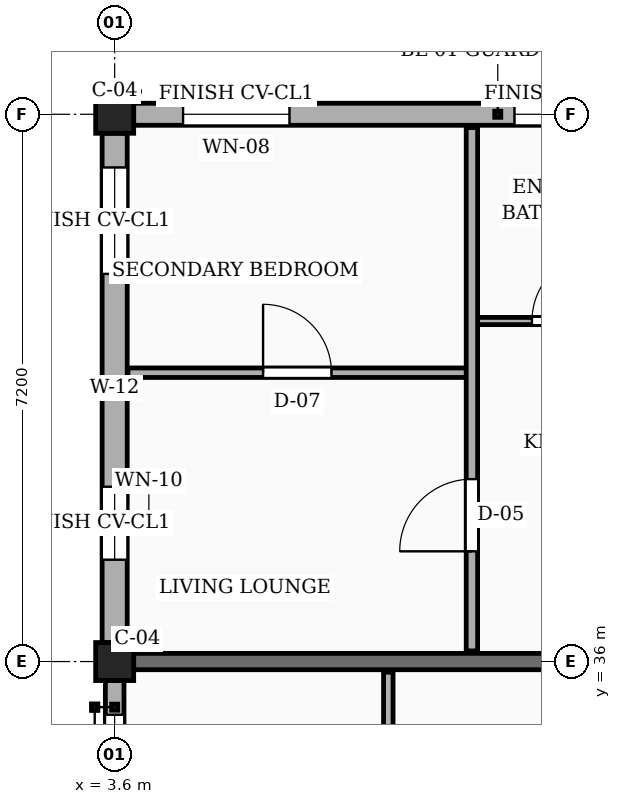
"""IFC4 building model, lengths in metres.
Left out: names, types, materials, properties, quantities, classifications, styles, units other than length and angle.
Written with IfcOpenShell. Run it as: python <this file> out.ifc"""

import sys

from ifc_helpers import new_model, si_unit, direction, frame, frame_2d, origin, origin_2d, place, context, subcontext, project, spatial, rectangle, extrude, element, fill, save


model = new_model("IFC4")
c1 = context("Model", 3, precision=1e-05, world=origin(), true_north=direction((0.0, 1.0)))
c2 = subcontext(c1, "Body", "Model", "MODEL_VIEW")
j1 = project(units=[si_unit("LENGTHUNIT", "METRE"), si_unit("PLANEANGLEUNIT", "RADIAN")], contexts=[c1])
p1 = place(None, origin())
s1 = spatial("IfcSite", under=j1, at=p1, CompositionType="ELEMENT")
p2 = place(p1, origin())
s2 = spatial("IfcBuilding", under=s1, at=p2, CompositionType="ELEMENT")
p3 = place(p2, frame((0.0, 0.0, 32.85)))
s3 = spatial("IfcBuildingStorey", under=s2, at=p3, CompositionType="ELEMENT", Elevation=32.85)
for number, where, z_axis, x_axis in (
    (1, (3.6, 36.0, 0.0), (0.0, 0.0, 1.0), (1.0, 0.0, 0.0)),
    (2, (3.6, 43.2, 0.0), (0.0, 0.0, 1.0), (1.0, 0.0, 0.0)),
):
    element("IfcColumn", number, at=place(p3, frame(where, z_axis=z_axis, x_axis=x_axis)), inside=s3, PredefinedType="COLUMN", context=c2, shape_type="SweptSolid", body=[
        extrude(rectangle(XDim=0.5, YDim=0.5, at=origin_2d()), origin(), (0.0, 0.0, 1.0), 3.15),
    ])
p4 = place(p3, frame((3.85, 36.0, 0.0), z_axis=(0.0, 0.0, 1.0), x_axis=(1.0, 0.0, 0.0)))
e3 = element("IfcWall", 3, at=p4, inside=s3, PredefinedType="SOLIDWALL", context=c2, shape_type="SweptSolid", body=[
    extrude(rectangle(XDim=6.75, YDim=0.215, at=frame_2d((3.375, 0.0))), origin(), (0.0, 0.0, 1.0), 2.17),
])
p5 = place(p3, frame((10.55, 43.2, 0.0), z_axis=(0.0, 0.0, 1.0), x_axis=(-1.0, 0.0, 0.0)))
e4 = element("IfcWall", 4, at=p5, inside=s3, PredefinedType="SOLIDWALL", context=c2, shape_type="SweptSolid", body=[
    extrude(rectangle(XDim=6.7, YDim=0.29, at=frame_2d((3.35, 0.0))), origin(), (0.0, 0.0, 1.0), 2.44),
])
p6 = place(p5, frame((0.45, 0.0, 0.78)))
e5 = element("IfcOpeningElement", 5, at=p6, cuts=e4, PredefinedType="OPENING", context=c2, shape_type="SweptSolid", body=[
    extrude(rectangle(XDim=1.24, YDim=1.15, at=frame_2d((0.62, 0.575))), frame((0.0, 0.155, 0.0), z_axis=(0.0, -1.0, 0.0), x_axis=(1.0, 0.0, 0.0)), (0.0, 0.0, 1.0), 0.31),
])
p7 = place(p5, frame((4.65, 0.0, 0.78)))
e6 = element("IfcOpeningElement", 6, at=p7, cuts=e4, PredefinedType="OPENING", context=c2, shape_type="SweptSolid", body=[
    extrude(rectangle(XDim=1.4, YDim=1.15, at=frame_2d((0.7, 0.575))), frame((0.0, 0.155, 0.0), z_axis=(0.0, -1.0, 0.0), x_axis=(1.0, 0.0, 0.0)), (0.0, 0.0, 1.0), 0.31),
])
p8 = place(p3, frame((3.6, 42.95, 0.0), z_axis=(0.0, 0.0, 1.0), x_axis=(0.0, -1.0, 0.0)))
e7 = element("IfcWall", 7, at=p8, inside=s3, PredefinedType="SOLIDWALL", context=c2, shape_type="SweptSolid", body=[
    extrude(rectangle(XDim=6.7, YDim=0.33, at=frame_2d((3.35, 0.0))), origin(), (0.0, 0.0, 1.0), 2.44),
])
p9 = place(p8, frame((0.45, 0.0, 0.78)))
e8 = element("IfcOpeningElement", 8, at=p9, cuts=e7, PredefinedType="OPENING", context=c2, shape_type="SweptSolid", body=[
    extrude(rectangle(XDim=1.4, YDim=1.15, at=frame_2d((0.7, 0.575))), frame((0.0, 0.175, 0.0), z_axis=(0.0, -1.0, 0.0), x_axis=(1.0, 0.0, 0.0)), (0.0, 0.0, 1.0), 0.35),
])
p10 = place(p8, frame((4.65, 0.0, 0.78)))
e9 = element("IfcOpeningElement", 9, at=p10, cuts=e7, PredefinedType="OPENING", context=c2, shape_type="SweptSolid", body=[
    extrude(rectangle(XDim=0.96, YDim=1.26, at=frame_2d((0.48, 0.63))), frame((0.0, 0.175, 0.0), z_axis=(0.0, -1.0, 0.0), x_axis=(1.0, 0.0, 0.0)), (0.0, 0.0, 1.0), 0.35),
])
p11 = place(p3, frame((3.6, 35.75, 0.0), z_axis=(0.0, 0.0, 1.0), x_axis=(0.0, -1.0, 0.0)))
e10 = element("IfcWall", 10, at=p11, inside=s3, PredefinedType="SOLIDWALL", context=c2, shape_type="SweptSolid", body=[
    extrude(rectangle(XDim=6.7, YDim=0.245, at=frame_2d((3.35, 0.0))), origin(), (0.0, 0.0, 1.0), 2.44),
])
p12 = place(p11, frame((0.45, 0.0, 0.78)))
e11 = element("IfcOpeningElement", 11, at=p12, cuts=e10, PredefinedType="OPENING", context=c2, shape_type="SweptSolid", body=[
    extrude(rectangle(XDim=0.96, YDim=1.26, at=frame_2d((0.48, 0.63))), frame((0.0, 0.133, 0.0), z_axis=(0.0, -1.0, 0.0), x_axis=(1.0, 0.0, 0.0)), (0.0, 0.0, 1.0), 0.265),
])
p13 = place(p11, frame((4.65, 0.0, 0.78)))
e12 = element("IfcOpeningElement", 12, at=p13, cuts=e10, PredefinedType="OPENING", context=c2, shape_type="SweptSolid", body=[
    extrude(rectangle(XDim=1.12, YDim=1.26, at=frame_2d((0.56, 0.63))), frame((0.0, 0.133, 0.0), z_axis=(0.0, -1.0, 0.0), x_axis=(1.0, 0.0, 0.0)), (0.0, 0.0, 1.0), 0.265),
])
p14 = place(p3, frame((7.2, 28.94, 0.0), z_axis=(0.0, 0.0, 1.0), x_axis=(0.0, 1.0, 0.0)))
e13 = element("IfcWall", 13, at=p14, inside=s3, PredefinedType="PARTITIONING", context=c2, shape_type="SweptSolid", body=[
    extrude(rectangle(XDim=6.92, YDim=0.125, at=frame_2d((3.46, 0.0))), origin(), (0.0, 0.0, 1.0), 2.305),
])
p15 = place(p14, frame((1.05, 0.0, 0.0)))
e14 = element("IfcOpeningElement", 14, at=p15, cuts=e13, PredefinedType="OPENING", context=c2, shape_type="SweptSolid", body=[
    extrude(rectangle(XDim=0.87, YDim=2.05, at=frame_2d((0.435, 1.025))), frame((0.0, 0.073, 0.0), z_axis=(0.0, -1.0, 0.0), x_axis=(1.0, 0.0, 0.0)), (0.0, 0.0, 1.0), 0.145),
])
p16 = place(p14, frame((4.45, 0.0, 0.0)))
e15 = element("IfcOpeningElement", 15, at=p16, cuts=e13, PredefinedType="OPENING", context=c2, shape_type="SweptSolid", body=[
    extrude(rectangle(XDim=0.88, YDim=2.08, at=frame_2d((0.44, 1.04))), frame((0.0, 0.073, 0.0), z_axis=(0.0, -1.0, 0.0), x_axis=(1.0, 0.0, 0.0)), (0.0, 0.0, 1.0), 0.145),
])
p17 = place(p3, frame((3.775, 39.8, 0.0), z_axis=(0.0, 0.0, 1.0), x_axis=(1.0, 0.0, 0.0)))
e16 = element("IfcWall", 16, at=p17, inside=s3, PredefinedType="PARTITIONING", context=c2, shape_type="SweptSolid", body=[
    extrude(rectangle(XDim=4.455, YDim=0.125, at=frame_2d((2.228, 0.0))), origin(), (0.0, 0.0, 1.0), 2.305),
])
p18 = place(p17, frame((1.778, 0.0, 0.0)))
e17 = element("IfcOpeningElement", 17, at=p18, cuts=e16, PredefinedType="OPENING", context=c2, shape_type="SweptSolid", body=[
    extrude(rectangle(XDim=0.9, YDim=2.1, at=frame_2d((0.45, 1.05))), frame((0.0, 0.073, 0.0), z_axis=(0.0, -1.0, 0.0), x_axis=(1.0, 0.0, 0.0)), (0.0, 0.0, 1.0), 0.145),
])
p19 = place(p3, frame((8.37, 40.48, 0.0), z_axis=(0.0, 0.0, 1.0), x_axis=(1.0, 0.0, 0.0)))
e18 = element("IfcWall", 18, at=p19, inside=s3, PredefinedType="PARTITIONING", context=c2, shape_type="SweptSolid", body=[
    extrude(rectangle(XDim=2.34, YDim=0.095, at=frame_2d((1.17, 0.0))), origin(), (0.0, 0.0, 1.0), 2.305),
])
p20 = place(p19, frame((0.72, 0.0, 0.0)))
e19 = element("IfcOpeningElement", 19, at=p20, cuts=e18, PredefinedType="OPENING", context=c2, shape_type="SweptSolid", body=[
    extrude(rectangle(XDim=0.9, YDim=2.05, at=frame_2d((0.45, 1.025))), frame((0.0, 0.058, 0.0), z_axis=(0.0, -1.0, 0.0), x_axis=(1.0, 0.0, 0.0)), (0.0, 0.0, 1.0), 0.115),
])
p21 = place(p3, frame((8.3, 36.14, 0.0), z_axis=(0.0, 0.0, 1.0), x_axis=(0.0, 1.0, 0.0)))
e20 = element("IfcWall", 20, at=p21, inside=s3, PredefinedType="PARTITIONING", context=c2, shape_type="SweptSolid", body=[
    extrude(rectangle(XDim=6.885, YDim=0.15, at=frame_2d((3.442, 0.0))), origin(), (0.0, 0.0, 1.0), 2.305),
])
p22 = place(p21, frame((1.31, 0.0, 0.0)))
e21 = element("IfcOpeningElement", 21, at=p22, cuts=e20, PredefinedType="OPENING", context=c2, shape_type="SweptSolid", body=[
    extrude(rectangle(XDim=0.95, YDim=2.1, at=frame_2d((0.475, 1.05))), frame((0.0, 0.085, 0.0), z_axis=(0.0, -1.0, 0.0), x_axis=(1.0, 0.0, 0.0)), (0.0, 0.0, 1.0), 0.17),
])
p23 = place(p6, origin())
e22 = element("IfcWindow", 22, at=p23, inside=s3, PartitioningType="SINGLE_PANEL", PredefinedType="WINDOW", context=c2, shape_type="SweptSolid", body=[
    extrude(rectangle(XDim=1.24, YDim=1.15, at=frame_2d((0.62, 0.575))), frame((0.0, 0.03, 0.0), z_axis=(0.0, -1.0, 0.0), x_axis=(1.0, 0.0, 0.0)), (0.0, 0.0, 1.0), 0.06),
])
fill(e5, e22)
p24 = place(p7, origin())
e23 = element("IfcWindow", 23, at=p24, inside=s3, PartitioningType="SINGLE_PANEL", PredefinedType="WINDOW", context=c2, shape_type="SweptSolid", body=[
    extrude(rectangle(XDim=1.4, YDim=1.15, at=frame_2d((0.7, 0.575))), frame((0.0, 0.03, 0.0), z_axis=(0.0, -1.0, 0.0), x_axis=(1.0, 0.0, 0.0)), (0.0, 0.0, 1.0), 0.06),
])
fill(e6, e23)
p25 = place(p9, origin())
e24 = element("IfcWindow", 24, at=p25, inside=s3, PartitioningType="SINGLE_PANEL", PredefinedType="WINDOW", context=c2, shape_type="SweptSolid", body=[
    extrude(rectangle(XDim=1.4, YDim=1.15, at=frame_2d((0.7, 0.575))), frame((0.0, 0.03, 0.0), z_axis=(0.0, -1.0, 0.0), x_axis=(1.0, 0.0, 0.0)), (0.0, 0.0, 1.0), 0.06),
])
fill(e8, e24)
p26 = place(p10, origin())
e25 = element("IfcWindow", 25, at=p26, inside=s3, PartitioningType="SINGLE_PANEL", PredefinedType="WINDOW", context=c2, shape_type="SweptSolid", body=[
    extrude(rectangle(XDim=0.96, YDim=1.26, at=frame_2d((0.48, 0.63))), frame((0.0, 0.03, 0.0), z_axis=(0.0, -1.0, 0.0), x_axis=(1.0, 0.0, 0.0)), (0.0, 0.0, 1.0), 0.06),
])
fill(e9, e25)
p27 = place(p12, origin())
e26 = element("IfcWindow", 26, at=p27, inside=s3, PartitioningType="SINGLE_PANEL", PredefinedType="WINDOW", context=c2, shape_type="SweptSolid", body=[
    extrude(rectangle(XDim=0.96, YDim=1.26, at=frame_2d((0.48, 0.63))), frame((0.0, 0.03, 0.0), z_axis=(0.0, -1.0, 0.0), x_axis=(1.0, 0.0, 0.0)), (0.0, 0.0, 1.0), 0.06),
])
fill(e11, e26)
p28 = place(p18, origin())
e27 = element("IfcDoor", 27, at=p28, inside=s3, OperationType="SINGLE_SWING_LEFT", PredefinedType="DOOR", context=c2, shape_type="SweptSolid", body=[
    extrude(rectangle(XDim=0.9, YDim=2.1, at=frame_2d((0.45, 1.05))), frame((0.0, 0.025, 0.0), z_axis=(0.0, -1.0, 0.0), x_axis=(1.0, 0.0, 0.0)), (0.0, 0.0, 1.0), 0.05),
])
fill(e17, e27)
p29 = place(p20, origin())
e28 = element("IfcDoor", 28, at=p29, inside=s3, OperationType="SINGLE_SWING_RIGHT", PredefinedType="DOOR", context=c2, shape_type="SweptSolid", body=[
    extrude(rectangle(XDim=0.9, YDim=2.05, at=frame_2d((0.45, 1.025))), frame((0.0, 0.025, 0.0), z_axis=(0.0, -1.0, 0.0), x_axis=(1.0, 0.0, 0.0)), (0.0, 0.0, 1.0), 0.05),
])
fill(e19, e28)
p30 = place(p22, origin())
e29 = element("IfcDoor", 29, at=p30, inside=s3, OperationType="SINGLE_SWING_LEFT", PredefinedType="DOOR", context=c2, shape_type="SweptSolid", body=[
    extrude(rectangle(XDim=0.95, YDim=2.1, at=frame_2d((0.475, 1.05))), frame((0.0, 0.025, 0.0), z_axis=(0.0, -1.0, 0.0), x_axis=(1.0, 0.0, 0.0)), (0.0, 0.0, 1.0), 0.05),
])
fill(e21, e29)
save(model, sys.argv[1])
